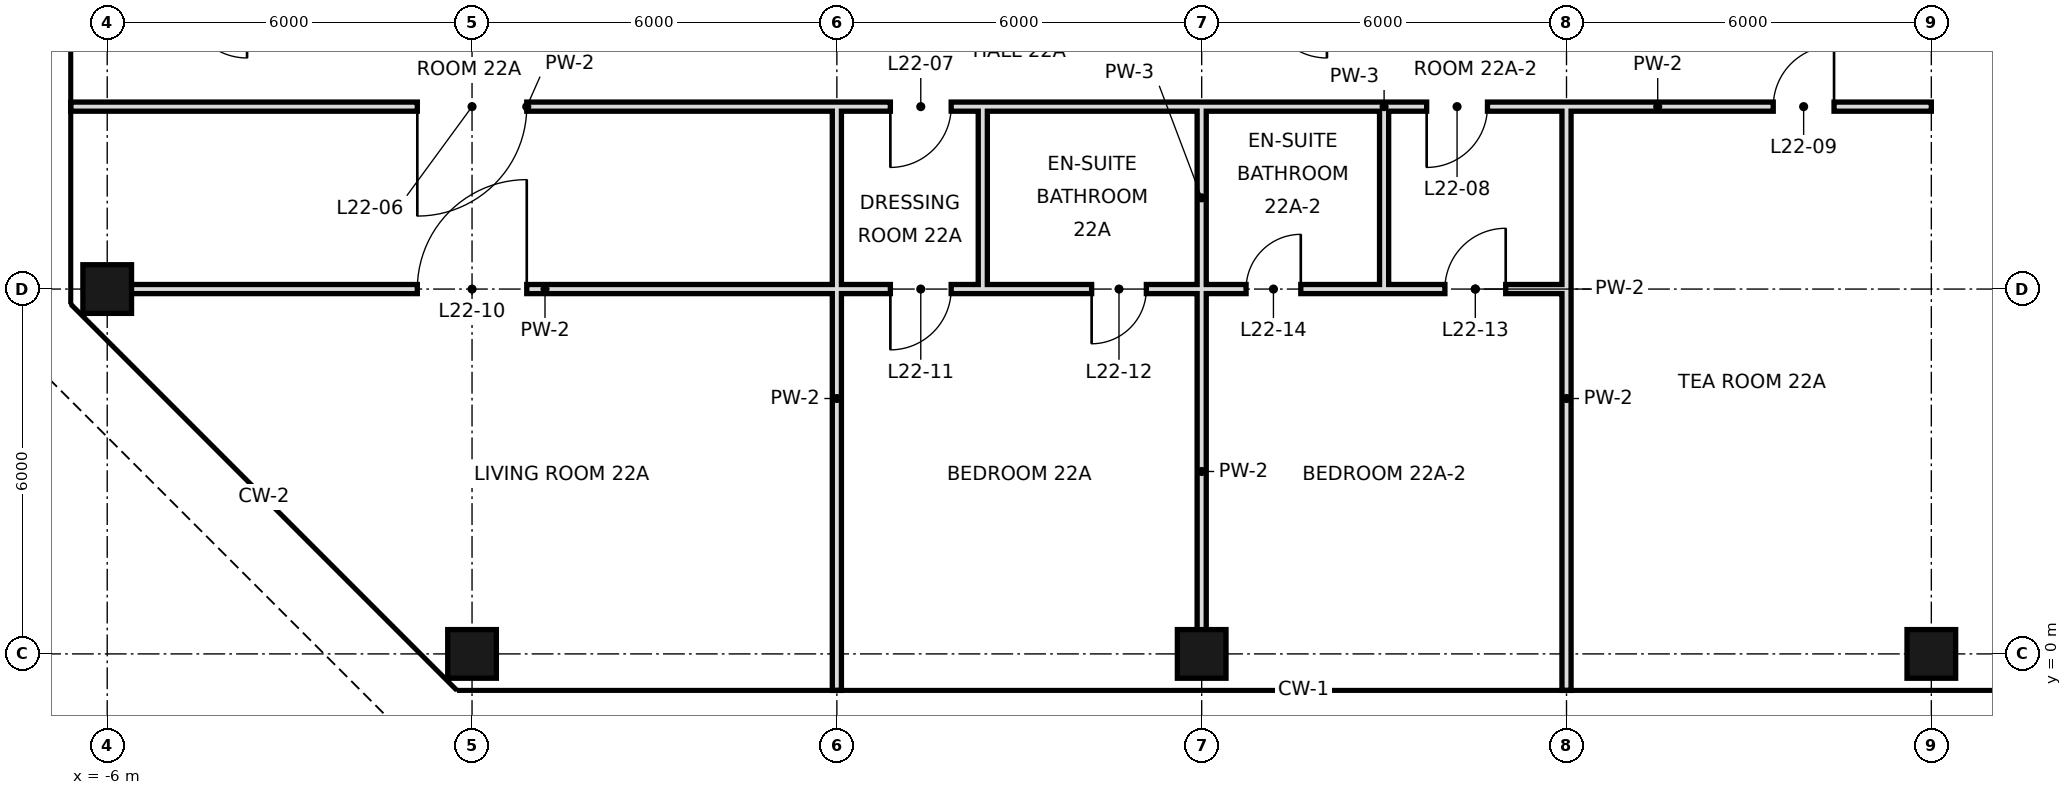
"""IFC4 building model, lengths in metres.
Left out: names, types, materials, properties, quantities, classifications, styles, units other than length and angle.
Written with IfcOpenShell. Run it as: python <this file> out.ifc"""

import sys

from ifc_helpers import new_model, si_unit, direction, frame, frame_2d, origin, origin_2d, place, context, subcontext, project, spatial, rectangle, hollow_rectangle, extrude, element, fill, save


model = new_model("IFC4")
c1 = context("Model", 3, precision=1e-05, world=origin(), true_north=direction((0.0, 1.0)))
c2 = subcontext(c1, "Body", "Model", "MODEL_VIEW")
j1 = project(units=[si_unit("LENGTHUNIT", "METRE"), si_unit("PLANEANGLEUNIT", "RADIAN")], contexts=[c1])
p1 = place(None, origin())
s1 = spatial("IfcSite", under=j1, at=p1, CompositionType="ELEMENT")
p2 = place(p1, origin())
s2 = spatial("IfcBuilding", under=s1, at=p2, CompositionType="ELEMENT")
p3 = place(p2, frame((0.0, 0.0, 103.4)))
s3 = spatial("IfcBuildingStorey", under=s2, at=p3, CompositionType="ELEMENT", Elevation=103.4)
for number, where, z_axis, x_axis in (
    (1, (-6.0, 6.0, 0.0), (0.0, 0.0, 1.0), (1.0, 0.0, 0.0)),
    (2, (0.0, 0.0, 0.0), (0.0, 0.0, 1.0), (1.0, 0.0, 0.0)),
    (3, (12.0, 0.0, 0.0), (0.0, 0.0, 1.0), (1.0, 0.0, 0.0)),
    (4, (24.0, 0.0, 0.0), (0.0, 0.0, 1.0), (1.0, 0.0, 0.0)),
):
    element("IfcColumn", number, at=place(p3, frame(where, z_axis=z_axis, x_axis=x_axis)), inside=s3, PredefinedType="COLUMN", context=c2, shape_type="SweptSolid", body=[
        extrude(hollow_rectangle(XDim=0.8, YDim=0.8, WallThickness=0.04, at=origin_2d()), origin(), (0.0, 0.0, 1.0), 3.6),
    ])
p4 = place(p3, frame((12.0, 0.0, 0.0), z_axis=(0.0, 0.0, 1.0), x_axis=(0.0, 1.0, 0.0)))
e5 = element("IfcWall", 5, at=p4, inside=s3, PredefinedType="PARTITIONING", context=c2, shape_type="SweptSolid", body=[
    extrude(rectangle(XDim=6.0, YDim=0.15, at=frame_2d((3.0, 0.0))), origin(), (0.0, 0.0, 1.0), 2.72),
])
p5 = place(p3, frame((12.0, 6.0, 0.0), z_axis=(0.0, 0.0, 1.0), x_axis=(0.0, 1.0, 0.0)))
e6 = element("IfcWall", 6, at=p5, inside=s3, PredefinedType="PARTITIONING", context=c2, shape_type="SweptSolid", body=[
    extrude(rectangle(XDim=3.0, YDim=0.15, at=frame_2d((1.5, 0.0))), origin(), (0.0, 0.0, 1.0), 2.72),
])
p6 = place(p3, frame((15.0, 6.0, 0.0), z_axis=(0.0, 0.0, 1.0), x_axis=(0.0, 1.0, 0.0)))
e7 = element("IfcWall", 7, at=p6, inside=s3, PredefinedType="PARTITIONING", context=c2, shape_type="SweptSolid", body=[
    extrude(rectangle(XDim=3.0, YDim=0.15, at=frame_2d((1.5, 0.0))), origin(), (0.0, 0.0, 1.0), 3.42),
])
for number, where, z_axis, x_axis in (
    (8, (18.0, -0.6, 0.0), (0.0, 0.0, 1.0), (0.0, 1.0, 0.0)),
    (9, (6.0, -0.6, 0.0), (0.0, 0.0, 1.0), (0.0, 1.0, 0.0)),
):
    element("IfcWall", number, at=place(p3, frame(where, z_axis=z_axis, x_axis=x_axis)), inside=s3, PredefinedType="PARTITIONING", context=c2, shape_type="SweptSolid", body=[
        extrude(rectangle(XDim=9.6, YDim=0.15, at=frame_2d((4.8, 0.0))), origin(), (0.0, 0.0, 1.0), 2.72),
    ])
p7 = place(p3, frame((8.4, 6.0, 0.0), z_axis=(0.0, 0.0, 1.0), x_axis=(0.0, 1.0, 0.0)))
e10 = element("IfcWall", 10, at=p7, inside=s3, PredefinedType="PARTITIONING", context=c2, shape_type="SweptSolid", body=[
    extrude(rectangle(XDim=3.0, YDim=0.15, at=frame_2d((1.5, 0.0))), origin(), (0.0, 0.0, 1.0), 3.42),
])
p8 = place(p3, frame((-6.0, 6.0, 0.0), z_axis=(0.0, 0.0, 1.0), x_axis=(1.0, 0.0, 0.0)))
e11 = element("IfcWall", 11, at=p8, inside=s3, PredefinedType="PARTITIONING", context=c2, shape_type="SweptSolid", body=[
    extrude(rectangle(XDim=14.4, YDim=0.15, at=frame_2d((7.2, 0.0))), origin(), (0.0, 0.0, 1.0), 2.97),
])
p9 = place(p8, frame((5.1, 0.0, 0.0)))
e12 = element("IfcOpeningElement", 12, at=p9, cuts=e11, PredefinedType="OPENING", context=c2, shape_type="SweptSolid", body=[
    extrude(rectangle(XDim=1.8, YDim=2.4, at=frame_2d((0.9, 1.2))), frame((0.0, 0.085, 0.0), z_axis=(0.0, -1.0, 0.0), x_axis=(1.0, 0.0, 0.0)), (0.0, 0.0, 1.0), 0.17),
])
p10 = place(p8, frame((12.88, 0.0, 0.0)))
e13 = element("IfcOpeningElement", 13, at=p10, cuts=e11, PredefinedType="OPENING", context=c2, shape_type="SweptSolid", body=[
    extrude(rectangle(XDim=1.0, YDim=2.4, at=frame_2d((0.5, 1.2))), frame((0.0, 0.085, 0.0), z_axis=(0.0, -1.0, 0.0), x_axis=(1.0, 0.0, 0.0)), (0.0, 0.0, 1.0), 0.17),
])
p11 = place(p3, frame((15.0, 6.0, 0.0), z_axis=(0.0, 0.0, 1.0), x_axis=(1.0, 0.0, 0.0)))
e14 = element("IfcWall", 14, at=p11, inside=s3, PredefinedType="PARTITIONING", context=c2, shape_type="SweptSolid", body=[
    extrude(rectangle(XDim=3.0, YDim=0.15, at=frame_2d((1.5, 0.0))), origin(), (0.0, 0.0, 1.0), 2.97),
])
p12 = place(p11, frame((1.0, 0.0, 0.0)))
e15 = element("IfcOpeningElement", 15, at=p12, cuts=e14, PredefinedType="OPENING", context=c2, shape_type="SweptSolid", body=[
    extrude(rectangle(XDim=1.0, YDim=2.4, at=frame_2d((0.5, 1.2))), frame((0.0, 0.085, 0.0), z_axis=(0.0, -1.0, 0.0), x_axis=(1.0, 0.0, 0.0)), (0.0, 0.0, 1.0), 0.17),
])
p13 = place(p3, frame((8.4, 6.0, 0.0), z_axis=(0.0, 0.0, 1.0), x_axis=(1.0, 0.0, 0.0)))
e16 = element("IfcWall", 16, at=p13, inside=s3, PredefinedType="PARTITIONING", context=c2, shape_type="SweptSolid", body=[
    extrude(rectangle(XDim=6.6, YDim=0.15, at=frame_2d((3.3, 0.0))), origin(), (0.0, 0.0, 1.0), 2.97),
])
p14 = place(p13, frame((1.79, 0.0, 0.0)))
e17 = element("IfcOpeningElement", 17, at=p14, cuts=e16, PredefinedType="OPENING", context=c2, shape_type="SweptSolid", body=[
    extrude(rectangle(XDim=0.9, YDim=2.4, at=frame_2d((0.45, 1.2))), frame((0.0, 0.085, 0.0), z_axis=(0.0, -1.0, 0.0), x_axis=(1.0, 0.0, 0.0)), (0.0, 0.0, 1.0), 0.17),
])
p15 = place(p13, frame((4.33, 0.0, 0.0)))
e18 = element("IfcOpeningElement", 18, at=p15, cuts=e16, PredefinedType="OPENING", context=c2, shape_type="SweptSolid", body=[
    extrude(rectangle(XDim=0.9, YDim=2.4, at=frame_2d((0.45, 1.2))), frame((0.0, 0.085, 0.0), z_axis=(0.0, -1.0, 0.0), x_axis=(1.0, 0.0, 0.0)), (0.0, 0.0, 1.0), 0.17),
])
p16 = place(p3, frame((-6.6, 9.0, 0.0), z_axis=(0.0, 0.0, 1.0), x_axis=(1.0, 0.0, 0.0)))
e19 = element("IfcWall", 19, at=p16, inside=s3, PredefinedType="PARTITIONING", context=c2, shape_type="SweptSolid", body=[
    extrude(rectangle(XDim=15.0, YDim=0.15, at=frame_2d((7.5, 0.0))), origin(), (0.0, 0.0, 1.0), 3.42),
])
p17 = place(p16, frame((5.7, 0.0, 0.0)))
e20 = element("IfcOpeningElement", 20, at=p17, cuts=e19, PredefinedType="OPENING", context=c2, shape_type="SweptSolid", body=[
    extrude(rectangle(XDim=1.8, YDim=2.4, at=frame_2d((0.9, 1.2))), frame((0.0, 0.085, 0.0), z_axis=(0.0, -1.0, 0.0), x_axis=(1.0, 0.0, 0.0)), (0.0, 0.0, 1.0), 0.17),
])
p18 = place(p16, frame((13.48, 0.0, 0.0)))
e21 = element("IfcOpeningElement", 21, at=p18, cuts=e19, PredefinedType="OPENING", context=c2, shape_type="SweptSolid", body=[
    extrude(rectangle(XDim=1.0, YDim=2.4, at=frame_2d((0.5, 1.2))), frame((0.0, 0.085, 0.0), z_axis=(0.0, -1.0, 0.0), x_axis=(1.0, 0.0, 0.0)), (0.0, 0.0, 1.0), 0.17),
])
p19 = place(p3, frame((15.0, 9.0, 0.0), z_axis=(0.0, 0.0, 1.0), x_axis=(1.0, 0.0, 0.0)))
e22 = element("IfcWall", 22, at=p19, inside=s3, PredefinedType="PARTITIONING", context=c2, shape_type="SweptSolid", body=[
    extrude(rectangle(XDim=9.0, YDim=0.15, at=frame_2d((4.5, 0.0))), origin(), (0.0, 0.0, 1.0), 3.42),
])
p20 = place(p19, frame((0.7, 0.0, 0.0)))
e23 = element("IfcOpeningElement", 23, at=p20, cuts=e22, PredefinedType="OPENING", context=c2, shape_type="SweptSolid", body=[
    extrude(rectangle(XDim=1.0, YDim=2.4, at=frame_2d((0.5, 1.2))), frame((0.0, 0.085, 0.0), z_axis=(0.0, -1.0, 0.0), x_axis=(1.0, 0.0, 0.0)), (0.0, 0.0, 1.0), 0.17),
])
p21 = place(p19, frame((6.4, 0.0, 0.0)))
e24 = element("IfcOpeningElement", 24, at=p21, cuts=e22, PredefinedType="OPENING", context=c2, shape_type="SweptSolid", body=[
    extrude(rectangle(XDim=1.0, YDim=2.4, at=frame_2d((0.5, 1.2))), frame((0.0, 0.085, 0.0), z_axis=(0.0, -1.0, 0.0), x_axis=(1.0, 0.0, 0.0)), (0.0, 0.0, 1.0), 0.17),
])
p22 = place(p3, frame((8.4, 9.0, 0.0), z_axis=(0.0, 0.0, 1.0), x_axis=(1.0, 0.0, 0.0)))
e25 = element("IfcWall", 25, at=p22, inside=s3, PredefinedType="PARTITIONING", context=c2, shape_type="SweptSolid", body=[
    extrude(rectangle(XDim=6.6, YDim=0.15, at=frame_2d((3.3, 0.0))), origin(), (0.0, 0.0, 1.0), 3.42),
])
p23 = place(p17, frame((1.8, 0.0, 0.0), z_axis=(0.0, 0.0, 1.0), x_axis=(-1.0, 0.0, 0.0)))
e26 = element("IfcDoor", 26, at=p23, inside=s3, OperationType="SINGLE_SWING_RIGHT", PredefinedType="DOOR", context=c2, shape_type="SweptSolid", body=[
    extrude(rectangle(XDim=1.8, YDim=2.4, at=frame_2d((0.9, 1.2))), frame((0.0, 0.025, 0.0), z_axis=(0.0, -1.0, 0.0), x_axis=(1.0, 0.0, 0.0)), (0.0, 0.0, 1.0), 0.05),
])
fill(e20, e26)
p24 = place(p18, frame((1.0, 0.0, 0.0), z_axis=(0.0, 0.0, 1.0), x_axis=(-1.0, 0.0, 0.0)))
e27 = element("IfcDoor", 27, at=p24, inside=s3, OperationType="SINGLE_SWING_RIGHT", PredefinedType="DOOR", context=c2, shape_type="SweptSolid", body=[
    extrude(rectangle(XDim=1.0, YDim=2.4, at=frame_2d((0.5, 1.2))), frame((0.0, 0.025, 0.0), z_axis=(0.0, -1.0, 0.0), x_axis=(1.0, 0.0, 0.0)), (0.0, 0.0, 1.0), 0.05),
])
fill(e21, e27)
p25 = place(p20, frame((1.0, 0.0, 0.0), z_axis=(0.0, 0.0, 1.0), x_axis=(-1.0, 0.0, 0.0)))
e28 = element("IfcDoor", 28, at=p25, inside=s3, OperationType="SINGLE_SWING_RIGHT", PredefinedType="DOOR", context=c2, shape_type="SweptSolid", body=[
    extrude(rectangle(XDim=1.0, YDim=2.4, at=frame_2d((0.5, 1.2))), frame((0.0, 0.025, 0.0), z_axis=(0.0, -1.0, 0.0), x_axis=(1.0, 0.0, 0.0)), (0.0, 0.0, 1.0), 0.05),
])
fill(e23, e28)
p26 = place(p21, frame((1.0, 0.0, 0.0), z_axis=(0.0, 0.0, 1.0), x_axis=(-1.0, 0.0, 0.0)))
e29 = element("IfcDoor", 29, at=p26, inside=s3, OperationType="SINGLE_SWING_LEFT", PredefinedType="DOOR", context=c2, shape_type="SweptSolid", body=[
    extrude(rectangle(XDim=1.0, YDim=2.4, at=frame_2d((0.5, 1.2))), frame((0.0, 0.025, 0.0), z_axis=(0.0, -1.0, 0.0), x_axis=(1.0, 0.0, 0.0)), (0.0, 0.0, 1.0), 0.05),
])
fill(e24, e29)
p27 = place(p9, frame((1.8, 0.0, 0.0), z_axis=(0.0, 0.0, 1.0), x_axis=(-1.0, 0.0, 0.0)))
e30 = element("IfcDoor", 30, at=p27, inside=s3, OperationType="SINGLE_SWING_LEFT", PredefinedType="DOOR", context=c2, shape_type="SweptSolid", body=[
    extrude(rectangle(XDim=1.8, YDim=2.4, at=frame_2d((0.9, 1.2))), frame((0.0, 0.025, 0.0), z_axis=(0.0, -1.0, 0.0), x_axis=(1.0, 0.0, 0.0)), (0.0, 0.0, 1.0), 0.05),
])
fill(e12, e30)
p28 = place(p10, frame((1.0, 0.0, 0.0), z_axis=(0.0, 0.0, 1.0), x_axis=(-1.0, 0.0, 0.0)))
e31 = element("IfcDoor", 31, at=p28, inside=s3, OperationType="SINGLE_SWING_RIGHT", PredefinedType="DOOR", context=c2, shape_type="SweptSolid", body=[
    extrude(rectangle(XDim=1.0, YDim=2.4, at=frame_2d((0.5, 1.2))), frame((0.0, 0.025, 0.0), z_axis=(0.0, -1.0, 0.0), x_axis=(1.0, 0.0, 0.0)), (0.0, 0.0, 1.0), 0.05),
])
fill(e13, e31)
p29 = place(p14, frame((0.9, 0.0, 0.0), z_axis=(0.0, 0.0, 1.0), x_axis=(-1.0, 0.0, 0.0)))
e32 = element("IfcDoor", 32, at=p29, inside=s3, OperationType="SINGLE_SWING_RIGHT", PredefinedType="DOOR", context=c2, shape_type="SweptSolid", body=[
    extrude(rectangle(XDim=0.9, YDim=2.4, at=frame_2d((0.45, 1.2))), frame((0.0, 0.025, 0.0), z_axis=(0.0, -1.0, 0.0), x_axis=(1.0, 0.0, 0.0)), (0.0, 0.0, 1.0), 0.05),
])
fill(e17, e32)
p30 = place(p12, frame((1.0, 0.0, 0.0), z_axis=(0.0, 0.0, 1.0), x_axis=(-1.0, 0.0, 0.0)))
e33 = element("IfcDoor", 33, at=p30, inside=s3, OperationType="SINGLE_SWING_LEFT", PredefinedType="DOOR", context=c2, shape_type="SweptSolid", body=[
    extrude(rectangle(XDim=1.0, YDim=2.4, at=frame_2d((0.5, 1.2))), frame((0.0, 0.025, 0.0), z_axis=(0.0, -1.0, 0.0), x_axis=(1.0, 0.0, 0.0)), (0.0, 0.0, 1.0), 0.05),
])
fill(e15, e33)
p31 = place(p15, frame((0.9, 0.0, 0.0), z_axis=(0.0, 0.0, 1.0), x_axis=(-1.0, 0.0, 0.0)))
e34 = element("IfcDoor", 34, at=p31, inside=s3, OperationType="SINGLE_SWING_LEFT", PredefinedType="DOOR", context=c2, shape_type="SweptSolid", body=[
    extrude(rectangle(XDim=0.9, YDim=2.4, at=frame_2d((0.45, 1.2))), frame((0.0, 0.025, 0.0), z_axis=(0.0, -1.0, 0.0), x_axis=(1.0, 0.0, 0.0)), (0.0, 0.0, 1.0), 0.05),
])
fill(e18, e34)
save(model, sys.argv[1])
